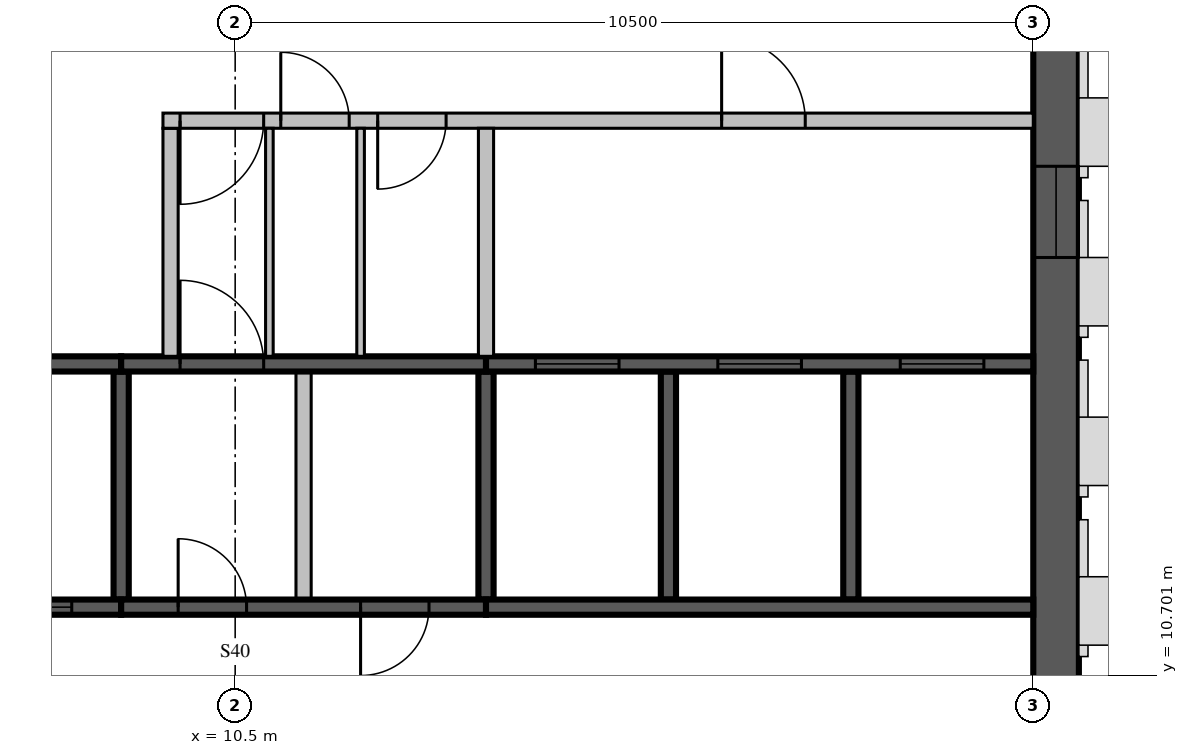
"""IFC4 building model, lengths in metres.
Left out: names, types, materials, properties, quantities, classifications, styles, units other than length and angle.
Written with IfcOpenShell. Run it as: python <this file> out.ifc"""

import sys

from ifc_helpers import new_model, si_unit, direction, frame, frame_2d, origin, place, context, subcontext, project, spatial, rectangle, extrude, source, transform, mapped, element, fill, save


model = new_model("IFC4")
c1 = context("Model", 3, precision=1e-05, world=origin(), true_north=direction((0.0, 1.0)))
c2 = subcontext(c1, "Body", "Model", "MODEL_VIEW")
j1 = project(units=[si_unit("LENGTHUNIT", "METRE"), si_unit("PLANEANGLEUNIT", "RADIAN")], contexts=[c1])
p1 = place(None, origin())
s1 = spatial("IfcSite", under=j1, at=p1, CompositionType="ELEMENT")
p2 = place(p1, origin())
s2 = spatial("IfcBuilding", under=s1, at=p2, CompositionType="ELEMENT")
p3 = place(p2, frame((0.0, 0.0, 337.0)))
s3 = spatial("IfcBuildingStorey", under=s2, at=p3, CompositionType="ELEMENT", Elevation=337.0)
m1 = source(origin(), c2, "Body", "SweptSolid", [
    extrude(rectangle(XDim=16.8, YDim=0.6, at=frame_2d((8.4, 0.0))), origin(), (0.0, 0.0, 1.0), 3.5),
])
p4 = place(p3, frame((21.3, 4.2, 0.0), z_axis=(0.0, 0.0, 1.0), x_axis=(0.0, 1.0, 0.0)))
e1 = element("IfcWall", 1, at=p4, inside=s3, PredefinedType="SHEAR", context=c2, shape_type="MappedRepresentation", body=[
    mapped(m1, transform((0.0, 0.0, 0.0), scale=1.0)),
])
m2 = source(origin(), c2, "Body", "SweptSolid", [
    extrude(rectangle(XDim=1.2, YDim=2.4, at=frame_2d((0.6, 1.2))), frame((0.0, 0.31, 0.0), z_axis=(0.0, -1.0, 0.0), x_axis=(1.0, 0.0, 0.0)), (0.0, 0.0, 1.0), 0.62),
])
p5 = place(p4, frame((12.0, 0.0, 0.6)))
e2 = element("IfcOpeningElement", 2, at=p5, cuts=e1, PredefinedType="OPENING", context=c2, shape_type="MappedRepresentation", body=[
    mapped(m2, transform((0.0, 0.0, 0.0), scale=1.0)),
])
m3 = source(origin(), c2, "Body", "SweptSolid", [
    extrude(rectangle(XDim=3.0, YDim=0.2, at=frame_2d((1.5, 0.0))), origin(), (0.0, 0.0, 1.0), 3.1),
])
for number, where, z_axis, x_axis in (
    (3, (9.0, 11.7, 0.0), (0.0, 0.0, 1.0), (0.0, 1.0, 0.0)),
    (4, (13.8, 11.7, 0.0), (0.0, 0.0, 1.0), (0.0, 1.0, 0.0)),
):
    element("IfcWall", number, at=place(p3, frame(where, z_axis=z_axis, x_axis=x_axis)), inside=s3, PredefinedType="SOLIDWALL", context=c2, shape_type="MappedRepresentation", body=[
        mapped(m3, transform((0.0, 0.0, 0.0), scale=1.0)),
    ])
m4 = source(origin(), c2, "Body", "SweptSolid", [
    extrude(rectangle(XDim=3.0, YDim=0.2, at=frame_2d((1.5, 0.0))), origin(), (0.0, 0.0, 1.0), 3.5),
])
for number, where, z_axis, x_axis in (
    (5, (16.2, 11.7, 0.0), (0.0, 0.0, 1.0), (0.0, 1.0, 0.0)),
    (6, (18.6, 11.7, 0.0), (0.0, 0.0, 1.0), (0.0, 1.0, 0.0)),
):
    element("IfcWall", number, at=place(p3, frame(where, z_axis=z_axis, x_axis=x_axis)), inside=s3, PredefinedType="SOLIDWALL", context=c2, shape_type="MappedRepresentation", body=[
        mapped(m4, transform((0.0, 0.0, 0.0), scale=1.0)),
    ])
m5 = source(origin(), c2, "Body", "SweptSolid", [
    extrude(rectangle(XDim=3.0, YDim=0.2, at=frame_2d((1.5, 0.0))), origin(), (0.0, 0.0, 1.0), 3.1),
])
p6 = place(p3, frame((11.4, 11.7, 0.0), z_axis=(0.0, 0.0, 1.0), x_axis=(0.0, 1.0, 0.0)))
e7 = element("IfcWall", 7, at=p6, inside=s3, PredefinedType="PARTITIONING", context=c2, shape_type="MappedRepresentation", body=[
    mapped(m5, transform((0.0, 0.0, 0.0), scale=1.0)),
])
m6 = source(origin(), c2, "Body", "SweptSolid", [
    extrude(rectangle(XDim=4.8, YDim=0.2, at=frame_2d((2.4, 0.0))), origin(), (0.0, 0.0, 1.0), 3.5),
])
p7 = place(p3, frame((4.2, 11.6, 0.0), z_axis=(0.0, 0.0, 1.0), x_axis=(1.0, 0.0, 0.0)))
e8 = element("IfcWall", 8, at=p7, inside=s3, PredefinedType="SOLIDWALL", context=c2, shape_type="MappedRepresentation", body=[
    mapped(m6, transform((0.0, 0.0, 0.0), scale=1.0)),
])
m7 = source(origin(), c2, "Body", "SweptSolid", [
    extrude(rectangle(XDim=1.1, YDim=2.1, at=frame_2d((0.55, 1.05))), frame((0.0, 0.11, 0.0), z_axis=(0.0, -1.0, 0.0), x_axis=(1.0, 0.0, 0.0)), (0.0, 0.0, 1.0), 0.22),
])
p8 = place(p7, frame((0.65, 0.0, 0.0)))
e9 = element("IfcOpeningElement", 9, at=p8, cuts=e8, PredefinedType="OPENING", context=c2, shape_type="MappedRepresentation", body=[
    mapped(m7, transform((0.0, 0.0, 0.0), scale=1.0)),
])
p9 = place(p7, frame((3.05, 0.0, 0.0)))
e10 = element("IfcOpeningElement", 10, at=p9, cuts=e8, PredefinedType="OPENING", context=c2, shape_type="MappedRepresentation", body=[
    mapped(m7, transform((0.0, 0.0, 0.0), scale=1.0)),
])
m8 = source(origin(), c2, "Body", "SweptSolid", [
    extrude(rectangle(XDim=4.8, YDim=0.2, at=frame_2d((2.4, 0.0))), origin(), (0.0, 0.0, 1.0), 3.1),
])
p10 = place(p3, frame((9.0, 11.6, 0.0), z_axis=(0.0, 0.0, 1.0), x_axis=(1.0, 0.0, 0.0)))
e11 = element("IfcWall", 11, at=p10, inside=s3, PredefinedType="SOLIDWALL", context=c2, shape_type="MappedRepresentation", body=[
    mapped(m8, transform((0.0, 0.0, 0.0), scale=1.0)),
])
m9 = source(origin(), c2, "Body", "SweptSolid", [
    extrude(rectangle(XDim=0.9, YDim=2.1, at=frame_2d((0.45, 1.05))), frame((0.0, 0.11, 0.0), z_axis=(0.0, -1.0, 0.0), x_axis=(1.0, 0.0, 0.0)), (0.0, 0.0, 1.0), 0.22),
])
p11 = place(p10, frame((0.75, 0.0, 0.0)))
e12 = element("IfcOpeningElement", 12, at=p11, cuts=e11, PredefinedType="OPENING", context=c2, shape_type="MappedRepresentation", body=[
    mapped(m9, transform((0.0, 0.0, 0.0), scale=1.0)),
])
p12 = place(p10, frame((3.15, 0.0, 0.0)))
e13 = element("IfcOpeningElement", 13, at=p12, cuts=e11, PredefinedType="OPENING", context=c2, shape_type="MappedRepresentation", body=[
    mapped(m9, transform((0.0, 0.0, 0.0), scale=1.0)),
])
m10 = source(origin(), c2, "Body", "SweptSolid", [
    extrude(rectangle(XDim=7.2, YDim=0.2, at=frame_2d((3.6, 0.0))), origin(), (0.0, 0.0, 1.0), 3.5),
])
p13 = place(p3, frame((13.8, 11.6, 0.0), z_axis=(0.0, 0.0, 1.0), x_axis=(1.0, 0.0, 0.0)))
e14 = element("IfcWall", 14, at=p13, inside=s3, PredefinedType="SOLIDWALL", context=c2, shape_type="MappedRepresentation", body=[
    mapped(m10, transform((0.0, 0.0, 0.0), scale=1.0)),
])
p14 = place(p3, frame((4.2, 14.8, 0.0), z_axis=(0.0, 0.0, 1.0), x_axis=(1.0, 0.0, 0.0)))
e15 = element("IfcWall", 15, at=p14, inside=s3, PredefinedType="SOLIDWALL", context=c2, shape_type="MappedRepresentation", body=[
    mapped(m6, transform((0.0, 0.0, 0.0), scale=1.0)),
])
p15 = place(p3, frame((9.0, 14.8, 0.0), z_axis=(0.0, 0.0, 1.0), x_axis=(1.0, 0.0, 0.0)))
e16 = element("IfcWall", 16, at=p15, inside=s3, PredefinedType="SOLIDWALL", context=c2, shape_type="MappedRepresentation", body=[
    mapped(m8, transform((0.0, 0.0, 0.0), scale=1.0)),
])
p16 = place(p15, frame((0.775, 0.0, 0.0)))
e17 = element("IfcOpeningElement", 17, at=p16, cuts=e16, PredefinedType="OPENING", context=c2, shape_type="MappedRepresentation", body=[
    mapped(m7, transform((0.0, 0.0, 0.0), scale=1.0)),
])
p17 = place(p3, frame((13.8, 14.8, 0.0), z_axis=(0.0, 0.0, 1.0), x_axis=(1.0, 0.0, 0.0)))
e18 = element("IfcWall", 18, at=p17, inside=s3, PredefinedType="SOLIDWALL", context=c2, shape_type="MappedRepresentation", body=[
    mapped(m10, transform((0.0, 0.0, 0.0), scale=1.0)),
])
p18 = place(p17, frame((0.65, 0.0, 0.0)))
e19 = element("IfcOpeningElement", 19, at=p18, cuts=e18, PredefinedType="OPENING", context=c2, shape_type="MappedRepresentation", body=[
    mapped(m7, transform((0.0, 0.0, 0.0), scale=1.0)),
])
p19 = place(p17, frame((3.05, 0.0, 0.0)))
e20 = element("IfcOpeningElement", 20, at=p19, cuts=e18, PredefinedType="OPENING", context=c2, shape_type="MappedRepresentation", body=[
    mapped(m7, transform((0.0, 0.0, 0.0), scale=1.0)),
])
p20 = place(p17, frame((5.45, 0.0, 0.0)))
e21 = element("IfcOpeningElement", 21, at=p20, cuts=e18, PredefinedType="OPENING", context=c2, shape_type="MappedRepresentation", body=[
    mapped(m7, transform((0.0, 0.0, 0.0), scale=1.0)),
])
p21 = place(p3, frame((9.65, 14.9, 0.0), z_axis=(0.0, 0.0, 1.0), x_axis=(0.0, 1.0, 0.0)))
e22 = element("IfcWall", 22, at=p21, inside=s3, PredefinedType="PARTITIONING", context=c2, shape_type="MappedRepresentation", body=[
    mapped(m5, transform((0.0, 0.0, 0.0), scale=1.0)),
])
m11 = source(origin(), c2, "Body", "SweptSolid", [
    extrude(rectangle(XDim=11.45, YDim=0.2, at=frame_2d((5.725, 0.0))), origin(), (0.0, 0.0, 1.0), 3.1),
])
p22 = place(p3, frame((9.55, 18.0, 0.0), z_axis=(0.0, 0.0, 1.0), x_axis=(1.0, 0.0, 0.0)))
e23 = element("IfcWall", 23, at=p22, inside=s3, PredefinedType="PARTITIONING", context=c2, shape_type="MappedRepresentation", body=[
    mapped(m11, transform((0.0, 0.0, 0.0), scale=1.0)),
])
p23 = place(p22, frame((0.225, 0.0, 0.0)))
e24 = element("IfcOpeningElement", 24, at=p23, cuts=e23, PredefinedType="OPENING", context=c2, shape_type="MappedRepresentation", body=[
    mapped(m7, transform((0.0, 0.0, 0.0), scale=1.0)),
])
p24 = place(p22, frame((1.55, 0.0, 0.0)))
e25 = element("IfcOpeningElement", 25, at=p24, cuts=e23, PredefinedType="OPENING", context=c2, shape_type="MappedRepresentation", body=[
    mapped(m9, transform((0.0, 0.0, 0.0), scale=1.0)),
])
p25 = place(p22, frame((2.825, 0.0, 0.0)))
e26 = element("IfcOpeningElement", 26, at=p25, cuts=e23, PredefinedType="OPENING", context=c2, shape_type="MappedRepresentation", body=[
    mapped(m9, transform((0.0, 0.0, 0.0), scale=1.0)),
])
p26 = place(p22, frame((7.35, 0.0, 0.0)))
e27 = element("IfcOpeningElement", 27, at=p26, cuts=e23, PredefinedType="OPENING", context=c2, shape_type="MappedRepresentation", body=[
    mapped(m7, transform((0.0, 0.0, 0.0), scale=1.0)),
])
p27 = place(p3, frame((13.8, 14.9, 0.0), z_axis=(0.0, 0.0, 1.0), x_axis=(0.0, 1.0, 0.0)))
e28 = element("IfcWall", 28, at=p27, inside=s3, PredefinedType="PARTITIONING", context=c2, shape_type="MappedRepresentation", body=[
    mapped(m5, transform((0.0, 0.0, 0.0), scale=1.0)),
])
m12 = source(origin(), c2, "Body", "SweptSolid", [
    extrude(rectangle(XDim=3.0, YDim=0.1, at=frame_2d((1.5, 0.0))), origin(), (0.0, 0.0, 1.0), 3.1),
])
for number, where, z_axis, x_axis in (
    (29, (10.95, 14.9, 0.0), (0.0, 0.0, 1.0), (0.0, 1.0, 0.0)),
    (30, (12.15, 14.9, 0.0), (0.0, 0.0, 1.0), (0.0, 1.0, 0.0)),
):
    element("IfcWall", number, at=place(p3, frame(where, z_axis=z_axis, x_axis=x_axis)), inside=s3, PredefinedType="PARTITIONING", context=c2, shape_type="MappedRepresentation", body=[
        mapped(m12, transform((0.0, 0.0, 0.0), scale=1.0)),
    ])
m13 = source(origin(), c2, "Body", "SweptSolid", [
    extrude(rectangle(XDim=1.1, YDim=2.1, at=frame_2d((0.55, 1.05))), frame((0.0, 0.025, 0.0), z_axis=(0.0, -1.0, 0.0), x_axis=(1.0, 0.0, 0.0)), (0.0, 0.0, 1.0), 0.05),
])
p28 = place(p9, origin())
e31 = element("IfcDoor", 31, at=p28, inside=s3, OperationType="SLIDING_TO_LEFT", PredefinedType="DOOR", context=c2, shape_type="MappedRepresentation", body=[
    mapped(m13, transform((0.0, 0.0, 0.0), scale=1.0)),
])
fill(e10, e31)
m14 = source(origin(), c2, "Body", "SweptSolid", [
    extrude(rectangle(XDim=0.9, YDim=2.1, at=frame_2d((0.45, 1.05))), frame((0.0, 0.025, 0.0), z_axis=(0.0, -1.0, 0.0), x_axis=(1.0, 0.0, 0.0)), (0.0, 0.0, 1.0), 0.05),
])
p29 = place(p11, origin())
e32 = element("IfcDoor", 32, at=p29, inside=s3, OperationType="SINGLE_SWING_LEFT", PredefinedType="DOOR", context=c2, shape_type="MappedRepresentation", body=[
    mapped(m14, transform((0.0, 0.0, 0.0), scale=1.0)),
])
fill(e12, e32)
p30 = place(p12, origin())
e33 = element("IfcDoor", 33, at=p30, inside=s3, OperationType="SINGLE_SWING_RIGHT", PredefinedType="DOOR", context=c2, shape_type="MappedRepresentation", body=[
    mapped(m14, transform((0.0, 0.0, 0.0), scale=1.0)),
])
fill(e13, e33)
p31 = place(p16, origin())
e34 = element("IfcDoor", 34, at=p31, inside=s3, OperationType="SINGLE_SWING_LEFT", PredefinedType="DOOR", context=c2, shape_type="MappedRepresentation", body=[
    mapped(m13, transform((0.0, 0.0, 0.0), scale=1.0)),
])
fill(e17, e34)
p32 = place(p18, origin())
e35 = element("IfcDoor", 35, at=p32, inside=s3, OperationType="SLIDING_TO_LEFT", PredefinedType="DOOR", context=c2, shape_type="MappedRepresentation", body=[
    mapped(m13, transform((0.0, 0.0, 0.0), scale=1.0)),
])
fill(e19, e35)
p33 = place(p19, origin())
e36 = element("IfcDoor", 36, at=p33, inside=s3, OperationType="SLIDING_TO_LEFT", PredefinedType="DOOR", context=c2, shape_type="MappedRepresentation", body=[
    mapped(m13, transform((0.0, 0.0, 0.0), scale=1.0)),
])
fill(e20, e36)
p34 = place(p20, origin())
e37 = element("IfcDoor", 37, at=p34, inside=s3, OperationType="SLIDING_TO_LEFT", PredefinedType="DOOR", context=c2, shape_type="MappedRepresentation", body=[
    mapped(m13, transform((0.0, 0.0, 0.0), scale=1.0)),
])
fill(e21, e37)
p35 = place(p23, origin())
e38 = element("IfcDoor", 38, at=p35, inside=s3, OperationType="SINGLE_SWING_RIGHT", PredefinedType="DOOR", context=c2, shape_type="MappedRepresentation", body=[
    mapped(m13, transform((0.0, 0.0, 0.0), scale=1.0)),
])
fill(e24, e38)
p36 = place(p24, origin())
e39 = element("IfcDoor", 39, at=p36, inside=s3, OperationType="SINGLE_SWING_LEFT", PredefinedType="DOOR", context=c2, shape_type="MappedRepresentation", body=[
    mapped(m14, transform((0.0, 0.0, 0.0), scale=1.0)),
])
fill(e25, e39)
p37 = place(p25, origin())
e40 = element("IfcDoor", 40, at=p37, inside=s3, OperationType="SINGLE_SWING_RIGHT", PredefinedType="DOOR", context=c2, shape_type="MappedRepresentation", body=[
    mapped(m14, transform((0.0, 0.0, 0.0), scale=1.0)),
])
fill(e26, e40)
p38 = place(p26, origin())
e41 = element("IfcDoor", 41, at=p38, inside=s3, OperationType="SINGLE_SWING_LEFT", PredefinedType="DOOR", context=c2, shape_type="MappedRepresentation", body=[
    mapped(m13, transform((0.0, 0.0, 0.0), scale=1.0)),
])
fill(e27, e41)
m15 = source(origin(), c2, "Body", "SweptSolid", [
    extrude(rectangle(XDim=1.2, YDim=2.4, at=frame_2d((0.6, 1.2))), frame((0.0, 0.03, 0.0), z_axis=(0.0, -1.0, 0.0), x_axis=(1.0, 0.0, 0.0)), (0.0, 0.0, 1.0), 0.06),
])
p39 = place(p5, origin())
e42 = element("IfcWindow", 42, at=p39, inside=s3, PartitioningType="SINGLE_PANEL", PredefinedType="WINDOW", context=c2, shape_type="MappedRepresentation", body=[
    mapped(m15, transform((0.0, 0.0, 0.0), scale=1.0)),
])
fill(e2, e42)
save(model, sys.argv[1])
